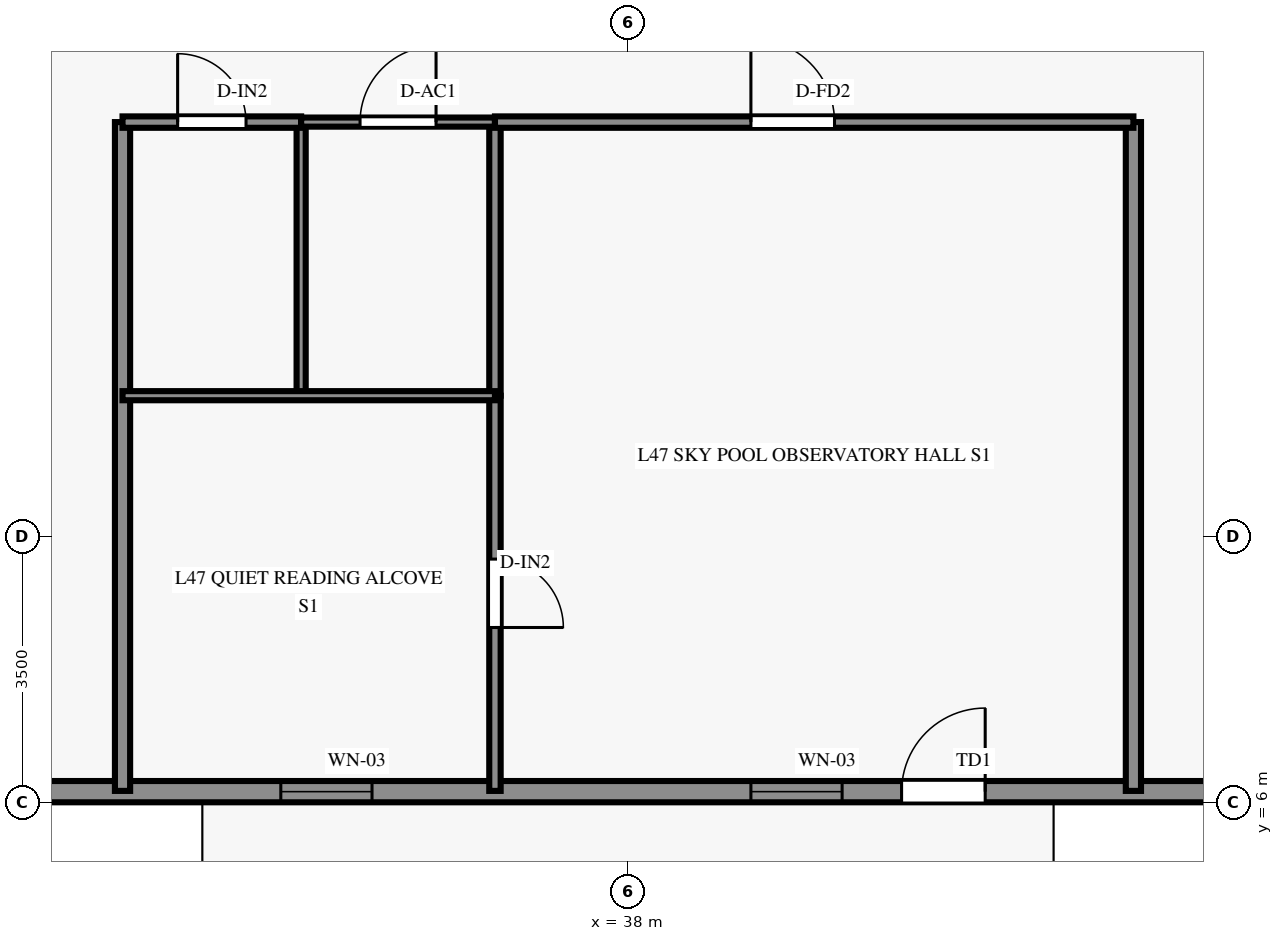
"""IFC4 building model, lengths in metres.
Left out: names, types, materials, properties, quantities, classifications, styles, units other than length and angle.
Written with IfcOpenShell. Run it as: python <this file> out.ifc"""

import sys

from ifc_helpers import new_model, si_unit, direction, frame, frame_2d, origin, origin_2d, place, context, subcontext, project, spatial, rectangle, extrude, source, transform, mapped, element, fill, save


model = new_model("IFC4")
c1 = context("Model", 3, precision=1e-05, world=origin(), true_north=direction((0.0, 1.0)))
c2 = subcontext(c1, "Body", "Model", "MODEL_VIEW")
j1 = project(units=[si_unit("LENGTHUNIT", "METRE"), si_unit("PLANEANGLEUNIT", "RADIAN")], contexts=[c1])
p1 = place(None, origin())
s1 = spatial("IfcSite", under=j1, at=p1, CompositionType="ELEMENT")
p2 = place(p1, origin())
s2 = spatial("IfcBuilding", under=s1, at=p2, CompositionType="ELEMENT")
p3 = place(p2, frame((0.0, 0.0, 148.7)))
s3 = spatial("IfcBuildingStorey", under=s2, at=p3, CompositionType="ELEMENT", Elevation=148.7)
m1 = source(origin(), c2, "Body", "SweptSolid", [
    extrude(rectangle(XDim=0.95, YDim=0.95, at=origin_2d()), origin(), (0.0, 0.0, 1.0), 3.5),
])
for number, where, z_axis, x_axis in (
    (1, (31.5, 6.0, 0.0), (0.0, 0.0, 1.0), (1.0, 0.0, 0.0)),
    (2, (44.5, 6.0, 0.0), (0.0, 0.0, 1.0), (1.0, 0.0, 0.0)),
):
    element("IfcColumn", number, at=place(p3, frame(where, z_axis=z_axis, x_axis=x_axis)), inside=s3, PredefinedType="COLUMN", context=c2, shape_type="MappedRepresentation", body=[
        mapped(m1, transform((0.0, 0.0, 0.0), scale=1.0)),
    ])
p4 = place(p3, frame((21.0, 6.14, 0.0), z_axis=(0.0, 0.0, 1.0), x_axis=(1.0, 0.0, 0.0)))
e3 = element("IfcWall", 3, at=p4, inside=s3, PredefinedType="SOLIDWALL", context=c2, shape_type="SweptSolid", body=[
    extrude(rectangle(XDim=34.0, YDim=0.28, at=frame_2d((17.0, 0.0))), origin(), (0.0, 0.0, 1.0), 2.39),
])
p5 = place(p4, frame((4.65, 0.0, 0.25)))
e4 = element("IfcOpeningElement", 4, at=p5, cuts=e3, PredefinedType="OPENING", context=c2, shape_type="SweptSolid", body=[
    extrude(rectangle(XDim=1.2, YDim=1.5, at=frame_2d((0.6, 0.75))), frame((0.0, 0.152, 0.0), z_axis=(0.0, -1.0, 0.0), x_axis=(1.0, 0.0, 0.0)), (0.0, 0.0, 1.0), 0.304),
])
p6 = place(p4, frame((12.433, 0.0, 0.25)))
e5 = element("IfcOpeningElement", 5, at=p6, cuts=e3, PredefinedType="OPENING", context=c2, shape_type="SweptSolid", body=[
    extrude(rectangle(XDim=1.2, YDim=1.5, at=frame_2d((0.6, 0.75))), frame((0.0, 0.152, 0.0), z_axis=(0.0, -1.0, 0.0), x_axis=(1.0, 0.0, 0.0)), (0.0, 0.0, 1.0), 0.304),
])
p7 = place(p4, frame((18.617, 0.0, 0.25)))
e6 = element("IfcOpeningElement", 6, at=p7, cuts=e3, PredefinedType="OPENING", context=c2, shape_type="SweptSolid", body=[
    extrude(rectangle(XDim=1.2, YDim=1.5, at=frame_2d((0.6, 0.75))), frame((0.0, 0.152, 0.0), z_axis=(0.0, -1.0, 0.0), x_axis=(1.0, 0.0, 0.0)), (0.0, 0.0, 1.0), 0.304),
])
p8 = place(p4, frame((28.15, 0.0, 0.25)))
e7 = element("IfcOpeningElement", 7, at=p8, cuts=e3, PredefinedType="OPENING", context=c2, shape_type="SweptSolid", body=[
    extrude(rectangle(XDim=1.2, YDim=1.5, at=frame_2d((0.6, 0.75))), frame((0.0, 0.152, 0.0), z_axis=(0.0, -1.0, 0.0), x_axis=(1.0, 0.0, 0.0)), (0.0, 0.0, 1.0), 0.304),
])
p9 = place(p4, frame((21.7, 0.0, 0.0), z_axis=(0.0, 0.0, 1.0), x_axis=(-1.0, 0.0, 0.0)))
e8 = element("IfcOpeningElement", 8, at=p9, cuts=e3, PredefinedType="OPENING", context=c2, shape_type="SweptSolid", body=[
    extrude(rectangle(XDim=1.1, YDim=2.15, at=frame_2d((0.55, 1.075))), frame((0.0, 0.152, 0.0), z_axis=(0.0, -1.0, 0.0), x_axis=(1.0, 0.0, 0.0)), (0.0, 0.0, 1.0), 0.304),
])
for number, where, z_axis, x_axis in (
    (9, (31.35, 14.95, 0.0), (0.0, 0.0, 1.0), (0.0, -1.0, 0.0)),
    (10, (44.65, 14.95, 0.0), (0.0, 0.0, 1.0), (0.0, -1.0, 0.0)),
):
    element("IfcWall", number, at=place(p3, frame(where, z_axis=z_axis, x_axis=x_axis)), inside=s3, PredefinedType="PARTITIONING", context=c2, shape_type="SweptSolid", body=[
        extrude(rectangle(XDim=8.8, YDim=0.2, at=frame_2d((4.4, 0.0))), origin(), (0.0, 0.0, 1.0), 2.39),
    ])
p10 = place(p3, frame((33.7, 14.95, 0.0), z_axis=(0.0, 0.0, 1.0), x_axis=(0.0, -1.0, 0.0)))
e11 = element("IfcWall", 11, at=p10, inside=s3, PredefinedType="PARTITIONING", context=c2, shape_type="SweptSolid", body=[
    extrude(rectangle(XDim=3.6, YDim=0.12, at=frame_2d((1.8, 0.0))), origin(), (0.0, 0.0, 1.0), 3.16),
])
p11 = place(p3, frame((36.25, 14.95, 0.0), z_axis=(0.0, 0.0, 1.0), x_axis=(0.0, -1.0, 0.0)))
e12 = element("IfcWall", 12, at=p11, inside=s3, PredefinedType="PARTITIONING", context=c2, shape_type="SweptSolid", body=[
    extrude(rectangle(XDim=3.6, YDim=0.15, at=frame_2d((1.8, 0.0))), origin(), (0.0, 0.0, 1.0), 3.16),
])
p12 = place(p3, frame((36.25, 11.35, 0.0), z_axis=(0.0, 0.0, 1.0), x_axis=(0.0, -1.0, 0.0)))
e13 = element("IfcWall", 13, at=p12, inside=s3, PredefinedType="PARTITIONING", context=c2, shape_type="SweptSolid", body=[
    extrude(rectangle(XDim=5.2, YDim=0.15, at=frame_2d((2.6, 0.0))), origin(), (0.0, 0.0, 1.0), 3.16),
])
p13 = place(p12, frame((2.15, 0.0, 0.0)))
e14 = element("IfcOpeningElement", 14, at=p13, cuts=e13, PredefinedType="OPENING", context=c2, shape_type="SweptSolid", body=[
    extrude(rectangle(XDim=0.9, YDim=2.1, at=frame_2d((0.45, 1.05))), frame((0.0, 0.087, 0.0), z_axis=(0.0, -1.0, 0.0), x_axis=(1.0, 0.0, 0.0)), (0.0, 0.0, 1.0), 0.174),
])
p14 = place(p3, frame((31.35, 11.35, 0.0), z_axis=(0.0, 0.0, 1.0), x_axis=(1.0, 0.0, 0.0)))
e15 = element("IfcWall", 15, at=p14, inside=s3, PredefinedType="PARTITIONING", context=c2, shape_type="SweptSolid", body=[
    extrude(rectangle(XDim=4.9, YDim=0.12, at=frame_2d((2.45, 0.0))), origin(), (0.0, 0.0, 1.0), 2.89),
])
p15 = place(p3, frame((31.35, 14.95, 0.0), z_axis=(0.0, 0.0, 1.0), x_axis=(1.0, 0.0, 0.0)))
e16 = element("IfcWall", 16, at=p15, inside=s3, PredefinedType="PARTITIONING", context=c2, shape_type="SweptSolid", body=[
    extrude(rectangle(XDim=2.35, YDim=0.15, at=frame_2d((1.175, 0.0))), origin(), (0.0, 0.0, 1.0), 3.16),
])
p16 = place(p15, frame((0.725, 0.0, 0.0)))
e17 = element("IfcOpeningElement", 17, at=p16, cuts=e16, PredefinedType="OPENING", context=c2, shape_type="SweptSolid", body=[
    extrude(rectangle(XDim=0.9, YDim=2.1, at=frame_2d((0.45, 1.05))), frame((0.0, 0.087, 0.0), z_axis=(0.0, -1.0, 0.0), x_axis=(1.0, 0.0, 0.0)), (0.0, 0.0, 1.0), 0.174),
])
p17 = place(p3, frame((33.7, 14.95, 0.0), z_axis=(0.0, 0.0, 1.0), x_axis=(1.0, 0.0, 0.0)))
e18 = element("IfcWall", 18, at=p17, inside=s3, PredefinedType="PARTITIONING", context=c2, shape_type="SweptSolid", body=[
    extrude(rectangle(XDim=2.55, YDim=0.12, at=frame_2d((1.275, 0.0))), origin(), (0.0, 0.0, 1.0), 3.16),
])
p18 = place(p17, frame((0.775, 0.0, 0.0)))
e19 = element("IfcOpeningElement", 19, at=p18, cuts=e18, PredefinedType="OPENING", context=c2, shape_type="SweptSolid", body=[
    extrude(rectangle(XDim=1.0, YDim=2.1, at=frame_2d((0.5, 1.05))), frame((0.0, 0.072, 0.0), z_axis=(0.0, -1.0, 0.0), x_axis=(1.0, 0.0, 0.0)), (0.0, 0.0, 1.0), 0.144),
])
p19 = place(p3, frame((36.25, 14.95, 0.0), z_axis=(0.0, 0.0, 1.0), x_axis=(1.0, 0.0, 0.0)))
e20 = element("IfcWall", 20, at=p19, inside=s3, PredefinedType="PARTITIONING", context=c2, shape_type="SweptSolid", body=[
    extrude(rectangle(XDim=8.4, YDim=0.15, at=frame_2d((4.2, 0.0))), origin(), (0.0, 0.0, 1.0), 3.16),
])
p20 = place(p19, frame((3.367, 0.0, 0.0)))
e21 = element("IfcOpeningElement", 21, at=p20, cuts=e20, PredefinedType="OPENING", context=c2, shape_type="SweptSolid", body=[
    extrude(rectangle(XDim=1.1, YDim=2.15, at=frame_2d((0.55, 1.075))), frame((0.0, 0.087, 0.0), z_axis=(0.0, -1.0, 0.0), x_axis=(1.0, 0.0, 0.0)), (0.0, 0.0, 1.0), 0.174),
])
m2 = source(origin(), c2, "Body", "SweptSolid", [
    extrude(rectangle(XDim=1.2, YDim=1.5, at=frame_2d((0.6, 0.75))), frame((0.0, 0.03, 0.0), z_axis=(0.0, -1.0, 0.0), x_axis=(1.0, 0.0, 0.0)), (0.0, 0.0, 1.0), 0.06),
])
p21 = place(p6, origin())
e22 = element("IfcWindow", 22, at=p21, inside=s3, PartitioningType="SINGLE_PANEL", PredefinedType="WINDOW", context=c2, shape_type="MappedRepresentation", body=[
    mapped(m2, transform((0.0, 0.0, 0.0), scale=1.0)),
])
fill(e5, e22)
p22 = place(p7, origin())
e23 = element("IfcWindow", 23, at=p22, inside=s3, PartitioningType="SINGLE_PANEL", PredefinedType="WINDOW", context=c2, shape_type="MappedRepresentation", body=[
    mapped(m2, transform((0.0, 0.0, 0.0), scale=1.0)),
])
fill(e6, e23)
m3 = source(origin(), c2, "Body", "SweptSolid", [
    extrude(rectangle(XDim=1.1, YDim=2.15, at=frame_2d((0.55, 1.075))), frame((0.0, 0.025, 0.0), z_axis=(0.0, -1.0, 0.0), x_axis=(1.0, 0.0, 0.0)), (0.0, 0.0, 1.0), 0.05),
])
p23 = place(p9, origin())
e24 = element("IfcDoor", 24, at=p23, inside=s3, OperationType="SINGLE_SWING_LEFT", PredefinedType="DOOR", context=c2, shape_type="MappedRepresentation", body=[
    mapped(m3, transform((0.0, 0.0, 0.0), scale=1.0)),
])
fill(e8, e24)
m4 = source(origin(), c2, "Body", "SweptSolid", [
    extrude(rectangle(XDim=0.9, YDim=2.1, at=frame_2d((0.45, 1.05))), frame((0.0, 0.025, 0.0), z_axis=(0.0, -1.0, 0.0), x_axis=(1.0, 0.0, 0.0)), (0.0, 0.0, 1.0), 0.05),
])
p24 = place(p13, origin())
e25 = element("IfcDoor", 25, at=p24, inside=s3, OperationType="SINGLE_SWING_RIGHT", PredefinedType="DOOR", context=c2, shape_type="MappedRepresentation", body=[
    mapped(m4, transform((0.0, 0.0, 0.0), scale=1.0)),
])
fill(e14, e25)
p25 = place(p16, origin())
e26 = element("IfcDoor", 26, at=p25, inside=s3, OperationType="SINGLE_SWING_LEFT", PredefinedType="DOOR", context=c2, shape_type="MappedRepresentation", body=[
    mapped(m4, transform((0.0, 0.0, 0.0), scale=1.0)),
])
fill(e17, e26)
m5 = source(origin(), c2, "Body", "SweptSolid", [
    extrude(rectangle(XDim=1.0, YDim=2.1, at=frame_2d((0.5, 1.05))), frame((0.0, 0.025, 0.0), z_axis=(0.0, -1.0, 0.0), x_axis=(1.0, 0.0, 0.0)), (0.0, 0.0, 1.0), 0.05),
])
p26 = place(p18, origin())
e27 = element("IfcDoor", 27, at=p26, inside=s3, OperationType="SINGLE_SWING_RIGHT", PredefinedType="DOOR", context=c2, shape_type="MappedRepresentation", body=[
    mapped(m5, transform((0.0, 0.0, 0.0), scale=1.0)),
])
fill(e19, e27)
p27 = place(p20, origin())
e28 = element("IfcDoor", 28, at=p27, inside=s3, OperationType="SINGLE_SWING_LEFT", PredefinedType="DOOR", context=c2, shape_type="MappedRepresentation", body=[
    mapped(m3, transform((0.0, 0.0, 0.0), scale=1.0)),
])
fill(e21, e28)
save(model, sys.argv[1])
